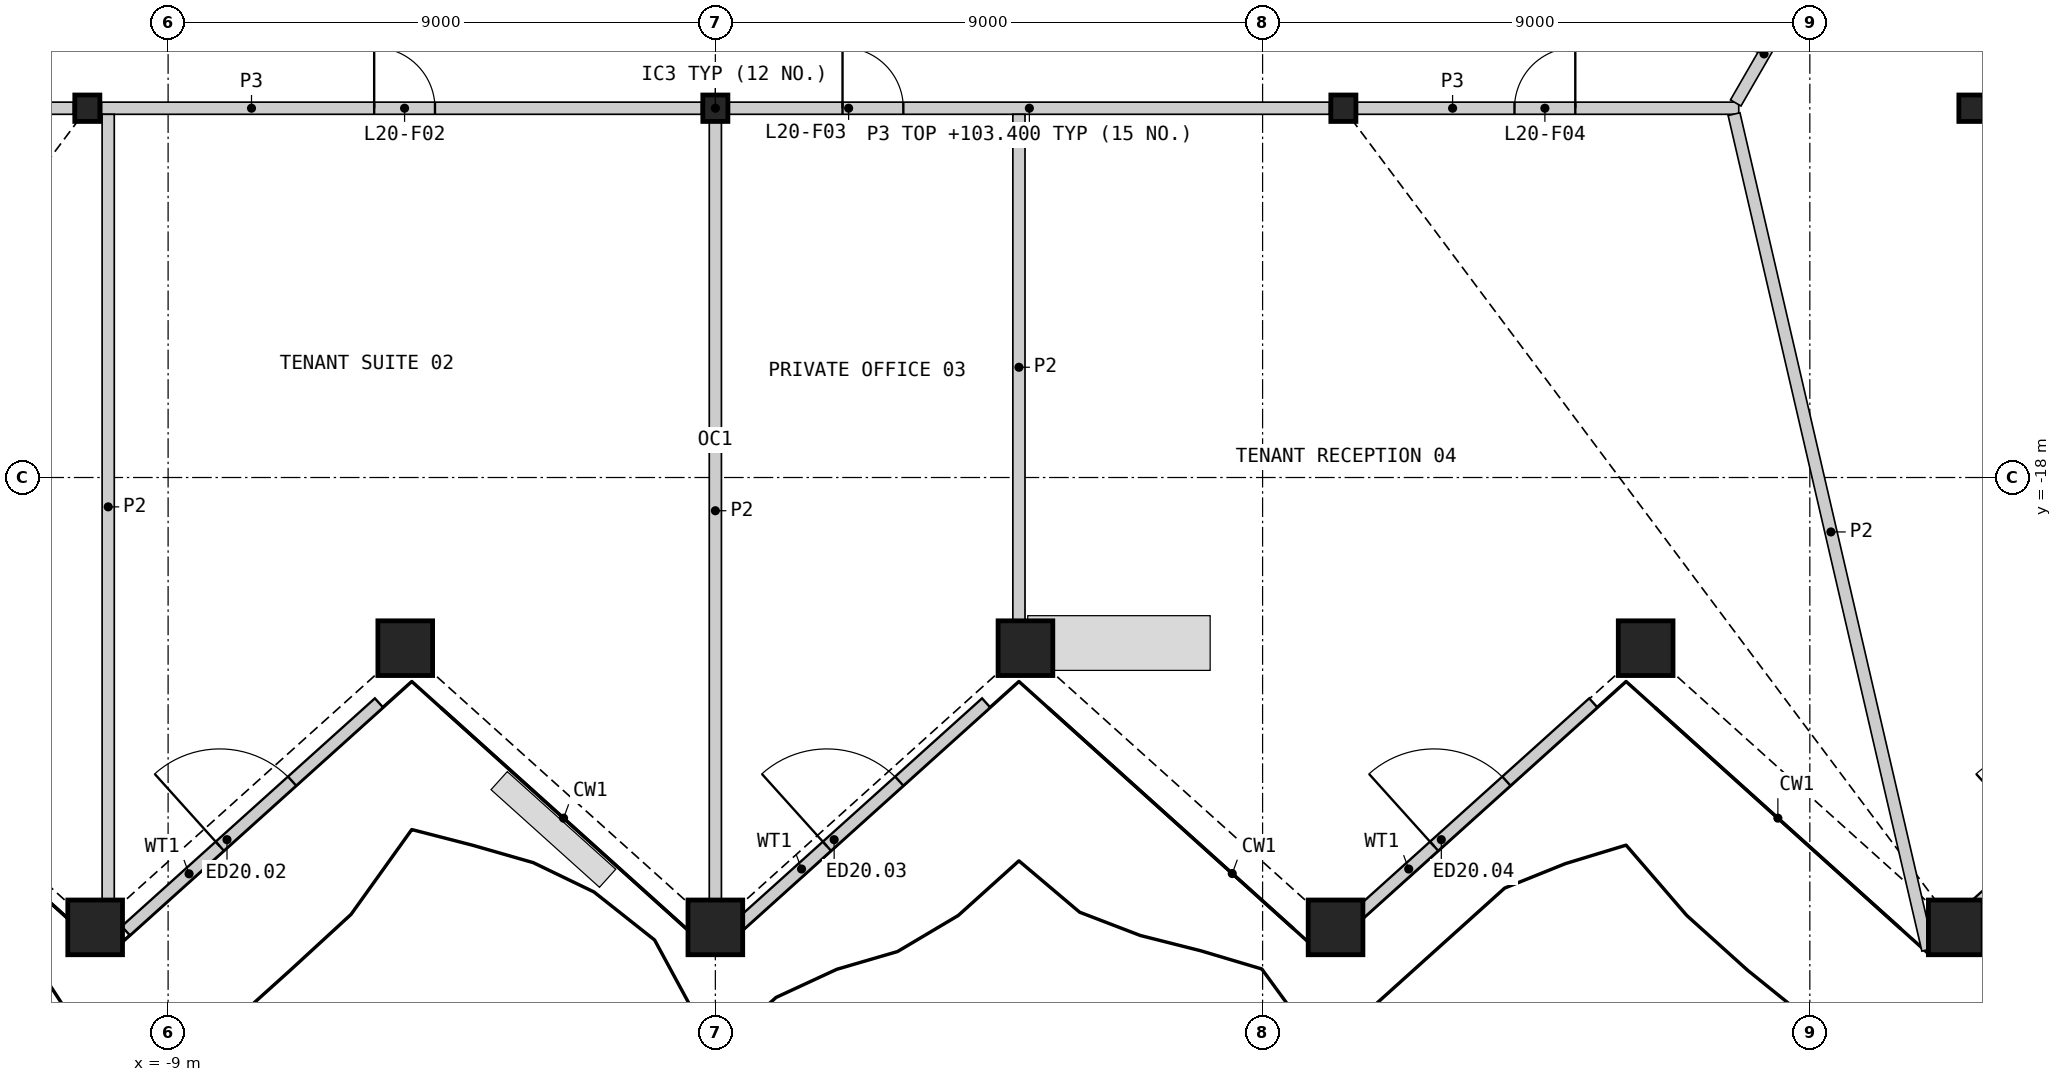
"""IFC4 building model, lengths in metres.
Left out: names, types, materials, properties, quantities, classifications, styles, units other than length and angle.
Written with IfcOpenShell. Run it as: python <this file> out.ifc"""

import sys

from ifc_helpers import new_model, si_unit, direction, frame, frame_2d, origin, origin_2d, place, context, subcontext, project, spatial, rectangle, hollow_rectangle, i_section, extrude, element, fill, save


model = new_model("IFC4")
c1 = context("Model", 3, precision=1e-05, world=origin(), true_north=direction((0.0, 1.0)))
c2 = subcontext(c1, "Body", "Model", "MODEL_VIEW")
j1 = project(units=[si_unit("LENGTHUNIT", "METRE"), si_unit("PLANEANGLEUNIT", "RADIAN")], contexts=[c1])
p1 = place(None, origin())
s1 = spatial("IfcSite", under=j1, at=p1, CompositionType="ELEMENT")
p2 = place(p1, origin())
s2 = spatial("IfcBuilding", under=s1, at=p2, CompositionType="ELEMENT")
p3 = place(p2, frame((0.0, 0.0, 99.6)))
s3 = spatial("IfcBuildingStorey", under=s2, at=p3, CompositionType="ELEMENT", Elevation=99.6)
for number, where, z_axis, x_axis in (
    (1, (-10.2, -25.399, 0.0), (0.0, 0.0, 1.0), (1.0, 0.0, 0.0)),
    (2, (-5.1, -20.807, 0.0), (0.0, 0.0, 1.0), (1.0, 0.0, 0.0)),
    (3, (0.0, -25.399, 0.0), (0.0, 0.0, 1.0), (1.0, 0.0, 0.0)),
    (4, (5.1, -20.807, 0.0), (0.0, 0.0, 1.0), (1.0, 0.0, 0.0)),
    (5, (10.2, -25.399, 0.0), (0.0, 0.0, 1.0), (1.0, 0.0, 0.0)),
    (6, (15.3, -20.807, 0.0), (0.0, 0.0, 1.0), (1.0, 0.0, 0.0)),
    (7, (20.4, -25.399, 0.0), (0.0, 0.0, 1.0), (1.0, 0.0, 0.0)),
):
    element("IfcColumn", number, at=place(p3, frame(where, z_axis=z_axis, x_axis=x_axis)), inside=s3, PredefinedType="COLUMN", context=c2, shape_type="SweptSolid", body=[
        extrude(hollow_rectangle(XDim=0.9, YDim=0.9, WallThickness=0.06, at=origin_2d()), origin(), (0.0, 0.0, 1.0), 4.2),
    ])
for number, where, z_axis, x_axis in (
    (8, (-10.328, -11.926, 0.0), (0.0, 0.0, 1.0), (1.0, 0.0, 0.0)),
    (9, (0.0, -11.926, 0.0), (0.0, 0.0, 1.0), (1.0, 0.0, 0.0)),
    (10, (10.328, -11.926, 0.0), (0.0, 0.0, 1.0), (1.0, 0.0, 0.0)),
    (11, (20.657, -11.926, 0.0), (0.0, 0.0, 1.0), (1.0, 0.0, 0.0)),
):
    element("IfcColumn", number, at=place(p3, frame(where, z_axis=z_axis, x_axis=x_axis)), inside=s3, PredefinedType="COLUMN", context=c2, shape_type="SweptSolid", body=[
        extrude(i_section(OverallWidth=0.412, OverallDepth=0.435, WebThickness=0.036, FlangeThickness=0.057, at=origin_2d()), origin(), (0.0, 0.0, 1.0), 4.2),
    ])
p4 = place(p3, frame((-9.696, -25.456, 0.0), z_axis=(0.0, 0.0, 1.0), x_axis=(0.743151138555, 0.66912359491, 0.0)))
e12 = element("IfcWall", 12, at=p4, inside=s3, PredefinedType="SOLIDWALL", context=c2, shape_type="SweptSolid", body=[
    extrude(rectangle(XDim=5.603, YDim=0.2, at=frame_2d((2.802, 0.0))), origin(), (0.0, 0.0, 1.0), 3.189),
])
p5 = place(p4, frame((2.08, 0.0, 0.0)))
e13 = element("IfcOpeningElement", 13, at=p5, cuts=e12, PredefinedType="OPENING", context=c2, shape_type="SweptSolid", body=[
    extrude(rectangle(XDim=1.6, YDim=2.4, at=frame_2d((0.8, 1.2))), frame((0.0, 0.11, 0.0), z_axis=(0.0, -1.0, 0.0), x_axis=(1.0, 0.0, 0.0)), (0.0, 0.0, 1.0), 0.22),
])
p6 = place(p3, frame((0.406, -25.351, 0.0), z_axis=(0.0, 0.0, 1.0), x_axis=(0.74314255731, 0.669133125405, 0.0)))
e14 = element("IfcWall", 14, at=p6, inside=s3, PredefinedType="SOLIDWALL", context=c2, shape_type="SweptSolid", body=[
    extrude(rectangle(XDim=5.446, YDim=0.2, at=frame_2d((2.723, 0.0))), origin(), (0.0, 0.0, 1.0), 3.189),
])
p7 = place(p6, frame((1.923, 0.0, 0.0)))
e15 = element("IfcOpeningElement", 15, at=p7, cuts=e14, PredefinedType="OPENING", context=c2, shape_type="SweptSolid", body=[
    extrude(rectangle(XDim=1.6, YDim=2.4, at=frame_2d((0.8, 1.2))), frame((0.0, 0.11, 0.0), z_axis=(0.0, -1.0, 0.0), x_axis=(1.0, 0.0, 0.0)), (0.0, 0.0, 1.0), 0.22),
])
p8 = place(p3, frame((10.391, -25.351, 0.0), z_axis=(0.0, 0.0, 1.0), x_axis=(0.74314255731, 0.669133125405, 0.0)))
e16 = element("IfcWall", 16, at=p8, inside=s3, PredefinedType="SOLIDWALL", context=c2, shape_type="SweptSolid", body=[
    extrude(rectangle(XDim=5.446, YDim=0.2, at=frame_2d((2.723, 0.0))), origin(), (0.0, 0.0, 1.0), 3.189),
])
p9 = place(p8, frame((1.923, 0.0, 0.0)))
e17 = element("IfcOpeningElement", 17, at=p9, cuts=e16, PredefinedType="OPENING", context=c2, shape_type="SweptSolid", body=[
    extrude(rectangle(XDim=1.6, YDim=2.4, at=frame_2d((0.8, 1.2))), frame((0.0, 0.11, 0.0), z_axis=(0.0, -1.0, 0.0), x_axis=(1.0, 0.0, 0.0)), (0.0, 0.0, 1.0), 0.22),
])
p10 = place(p3, frame((20.376, -25.351, 0.0), z_axis=(0.0, 0.0, 1.0), x_axis=(0.74314255731, 0.669133125405, 0.0)))
e18 = element("IfcWall", 18, at=p10, inside=s3, PredefinedType="SOLIDWALL", context=c2, shape_type="SweptSolid", body=[
    extrude(rectangle(XDim=5.446, YDim=0.2, at=frame_2d((2.723, 0.0))), origin(), (0.0, 0.0, 1.0), 3.189),
])
p11 = place(p10, frame((1.923, 0.0, 0.0)))
e19 = element("IfcOpeningElement", 19, at=p11, cuts=e18, PredefinedType="OPENING", context=c2, shape_type="SweptSolid", body=[
    extrude(rectangle(XDim=1.6, YDim=2.4, at=frame_2d((0.8, 1.2))), frame((0.0, 0.11, 0.0), z_axis=(0.0, -1.0, 0.0), x_axis=(1.0, 0.0, 0.0)), (0.0, 0.0, 1.0), 0.22),
])
p12 = place(p3, frame((0.227, -11.926, 0.0), z_axis=(0.0, 0.0, 1.0), x_axis=(1.0, 0.0, 0.0)))
e20 = element("IfcWall", 20, at=p12, inside=s3, PredefinedType="PARTITIONING", context=c2, shape_type="SweptSolid", body=[
    extrude(rectangle(XDim=9.874, YDim=0.2, at=frame_2d((4.937, 0.0))), origin(), (0.0, 0.0, 1.0), 3.8),
])
p13 = place(p12, frame((1.864, 0.0, 0.0)))
e21 = element("IfcOpeningElement", 21, at=p13, cuts=e20, PredefinedType="OPENING", context=c2, shape_type="SweptSolid", body=[
    extrude(rectangle(XDim=1.0, YDim=2.1, at=frame_2d((0.5, 1.05))), frame((0.0, 0.11, 0.0), z_axis=(0.0, -1.0, 0.0), x_axis=(1.0, 0.0, 0.0)), (0.0, 0.0, 1.0), 0.22),
])
p14 = place(p3, frame((-10.095, -11.926, 0.0), z_axis=(0.0, 0.0, 1.0), x_axis=(1.0, 0.0, 0.0)))
e22 = element("IfcWall", 22, at=p14, inside=s3, PredefinedType="PARTITIONING", context=c2, shape_type="SweptSolid", body=[
    extrude(rectangle(XDim=9.868, YDim=0.2, at=frame_2d((4.934, 0.0))), origin(), (0.0, 0.0, 1.0), 3.8),
])
p15 = place(p14, frame((4.484, 0.0, 0.0)))
e23 = element("IfcOpeningElement", 23, at=p15, cuts=e22, PredefinedType="OPENING", context=c2, shape_type="SweptSolid", body=[
    extrude(rectangle(XDim=1.0, YDim=2.1, at=frame_2d((0.5, 1.05))), frame((0.0, 0.11, 0.0), z_axis=(0.0, -1.0, 0.0), x_axis=(1.0, 0.0, 0.0)), (0.0, 0.0, 1.0), 0.22),
])
p16 = place(p3, frame((-16.831, -11.926, 0.0), z_axis=(0.0, 0.0, 1.0), x_axis=(1.0, 0.0, 0.0)))
e24 = element("IfcWall", 24, at=p16, inside=s3, PredefinedType="PARTITIONING", context=c2, shape_type="SweptSolid", body=[
    extrude(rectangle(XDim=6.275, YDim=0.2, at=frame_2d((3.137, 0.0))), origin(), (0.0, 0.0, 1.0), 3.8),
])
p17 = place(p16, frame((2.688, 0.0, 0.0)))
e25 = element("IfcOpeningElement", 25, at=p17, cuts=e24, PredefinedType="OPENING", context=c2, shape_type="SweptSolid", body=[
    extrude(rectangle(XDim=1.0, YDim=2.1, at=frame_2d((0.5, 1.05))), frame((0.0, 0.11, 0.0), z_axis=(0.0, -1.0, 0.0), x_axis=(1.0, 0.0, 0.0)), (0.0, 0.0, 1.0), 0.22),
])
p18 = place(p3, frame((10.556, -11.926, 0.0), z_axis=(0.0, 0.0, 1.0), x_axis=(1.0, 0.0, 0.0)))
e26 = element("IfcWall", 26, at=p18, inside=s3, PredefinedType="PARTITIONING", context=c2, shape_type="SweptSolid", body=[
    extrude(rectangle(XDim=6.275, YDim=0.2, at=frame_2d((3.137, 0.0))), origin(), (0.0, 0.0, 1.0), 3.8),
])
p19 = place(p18, frame((2.587, 0.0, 0.0)))
e27 = element("IfcOpeningElement", 27, at=p19, cuts=e26, PredefinedType="OPENING", context=c2, shape_type="SweptSolid", body=[
    extrude(rectangle(XDim=1.0, YDim=2.1, at=frame_2d((0.5, 1.05))), frame((0.0, 0.11, 0.0), z_axis=(0.0, -1.0, 0.0), x_axis=(1.0, 0.0, 0.0)), (0.0, 0.0, 1.0), 0.22),
])
p20 = place(p3, frame((16.781, -11.84, 0.0), z_axis=(0.0, 0.0, 1.0), x_axis=(0.499958791762, 0.866049194065, 0.0)))
e28 = element("IfcWall", 28, at=p20, inside=s3, PredefinedType="PARTITIONING", context=c2, shape_type="SweptSolid", body=[
    extrude(rectangle(XDim=3.726, YDim=0.2, at=frame_2d((1.863, 0.0))), origin(), (0.0, 0.0, 1.0), 3.8),
])
p21 = place(p20, frame((1.363, 0.0, 0.0)))
e29 = element("IfcOpeningElement", 29, at=p21, cuts=e28, PredefinedType="OPENING", context=c2, shape_type="SweptSolid", body=[
    extrude(rectangle(XDim=1.0, YDim=2.1, at=frame_2d((0.5, 1.05))), frame((0.0, 0.11, 0.0), z_axis=(0.0, -1.0, 0.0), x_axis=(1.0, 0.0, 0.0)), (0.0, 0.0, 1.0), 0.22),
])
p22 = place(p3, frame((16.753, -12.024, 0.0), z_axis=(0.0, 0.0, 1.0), x_axis=(0.225854066841, -0.974161147086, 0.0)))
e30 = element("IfcWall", 30, at=p22, inside=s3, PredefinedType="PARTITIONING", context=c2, shape_type="SweptSolid", body=[
    extrude(rectangle(XDim=14.108, YDim=0.2, at=frame_2d((7.054, 0.0))), origin(), (0.0, 0.0, 1.0), 2.885),
])
p23 = place(p3, frame((-9.985, -24.939, 0.0), z_axis=(0.0, 0.0, 1.0), x_axis=(0.0, 1.0, 0.0)))
e31 = element("IfcWall", 31, at=p23, inside=s3, PredefinedType="PARTITIONING", context=c2, shape_type="SweptSolid", body=[
    extrude(rectangle(XDim=12.913, YDim=0.2, at=frame_2d((6.457, 0.0))), origin(), (0.0, 0.0, 1.0), 2.885),
])
p24 = place(p3, frame((0.0, -24.939, 0.0), z_axis=(0.0, 0.0, 1.0), x_axis=(0.0, 1.0, 0.0)))
e32 = element("IfcWall", 32, at=p24, inside=s3, PredefinedType="PARTITIONING", context=c2, shape_type="SweptSolid", body=[
    extrude(rectangle(XDim=12.785, YDim=0.2, at=frame_2d((6.393, 0.0))), origin(), (0.0, 0.0, 1.0), 2.885),
])
p25 = place(p3, frame((4.993, -20.347, 0.0), z_axis=(0.0, 0.0, 1.0), x_axis=(0.0, 1.0, 0.0)))
e33 = element("IfcWall", 33, at=p25, inside=s3, PredefinedType="PARTITIONING", context=c2, shape_type="SweptSolid", body=[
    extrude(rectangle(XDim=8.321, YDim=0.2, at=frame_2d((4.16, 0.0))), origin(), (0.0, 0.0, 1.0), 2.885),
])
p26 = place(p5, origin())
e34 = element("IfcDoor", 34, at=p26, inside=s3, OperationType="DOUBLE_DOOR_SINGLE_SWING", PredefinedType="DOOR", context=c2, shape_type="SweptSolid", body=[
    extrude(rectangle(XDim=1.6, YDim=2.4, at=frame_2d((0.8, 1.2))), frame((0.0, 0.025, 0.0), z_axis=(0.0, -1.0, 0.0), x_axis=(1.0, 0.0, 0.0)), (0.0, 0.0, 1.0), 0.05),
])
fill(e13, e34)
p27 = place(p7, origin())
e35 = element("IfcDoor", 35, at=p27, inside=s3, OperationType="DOUBLE_DOOR_SINGLE_SWING", PredefinedType="DOOR", context=c2, shape_type="SweptSolid", body=[
    extrude(rectangle(XDim=1.6, YDim=2.4, at=frame_2d((0.8, 1.2))), frame((0.0, 0.025, 0.0), z_axis=(0.0, -1.0, 0.0), x_axis=(1.0, 0.0, 0.0)), (0.0, 0.0, 1.0), 0.05),
])
fill(e15, e35)
p28 = place(p9, origin())
e36 = element("IfcDoor", 36, at=p28, inside=s3, OperationType="DOUBLE_DOOR_SINGLE_SWING", PredefinedType="DOOR", context=c2, shape_type="SweptSolid", body=[
    extrude(rectangle(XDim=1.6, YDim=2.4, at=frame_2d((0.8, 1.2))), frame((0.0, 0.025, 0.0), z_axis=(0.0, -1.0, 0.0), x_axis=(1.0, 0.0, 0.0)), (0.0, 0.0, 1.0), 0.05),
])
fill(e17, e36)
p29 = place(p15, origin())
e37 = element("IfcDoor", 37, at=p29, inside=s3, OperationType="SINGLE_SWING_LEFT", PredefinedType="DOOR", context=c2, shape_type="SweptSolid", body=[
    extrude(rectangle(XDim=1.0, YDim=2.1, at=frame_2d((0.5, 1.05))), frame((0.0, 0.025, 0.0), z_axis=(0.0, -1.0, 0.0), x_axis=(1.0, 0.0, 0.0)), (0.0, 0.0, 1.0), 0.05),
])
fill(e23, e37)
p30 = place(p13, origin())
e38 = element("IfcDoor", 38, at=p30, inside=s3, OperationType="SINGLE_SWING_LEFT", PredefinedType="DOOR", context=c2, shape_type="SweptSolid", body=[
    extrude(rectangle(XDim=1.0, YDim=2.1, at=frame_2d((0.5, 1.05))), frame((0.0, 0.025, 0.0), z_axis=(0.0, -1.0, 0.0), x_axis=(1.0, 0.0, 0.0)), (0.0, 0.0, 1.0), 0.05),
])
fill(e21, e38)
p31 = place(p19, origin())
e39 = element("IfcDoor", 39, at=p31, inside=s3, OperationType="SINGLE_SWING_RIGHT", PredefinedType="DOOR", context=c2, shape_type="SweptSolid", body=[
    extrude(rectangle(XDim=1.0, YDim=2.1, at=frame_2d((0.5, 1.05))), frame((0.0, 0.025, 0.0), z_axis=(0.0, -1.0, 0.0), x_axis=(1.0, 0.0, 0.0)), (0.0, 0.0, 1.0), 0.05),
])
fill(e27, e39)
save(model, sys.argv[1])
